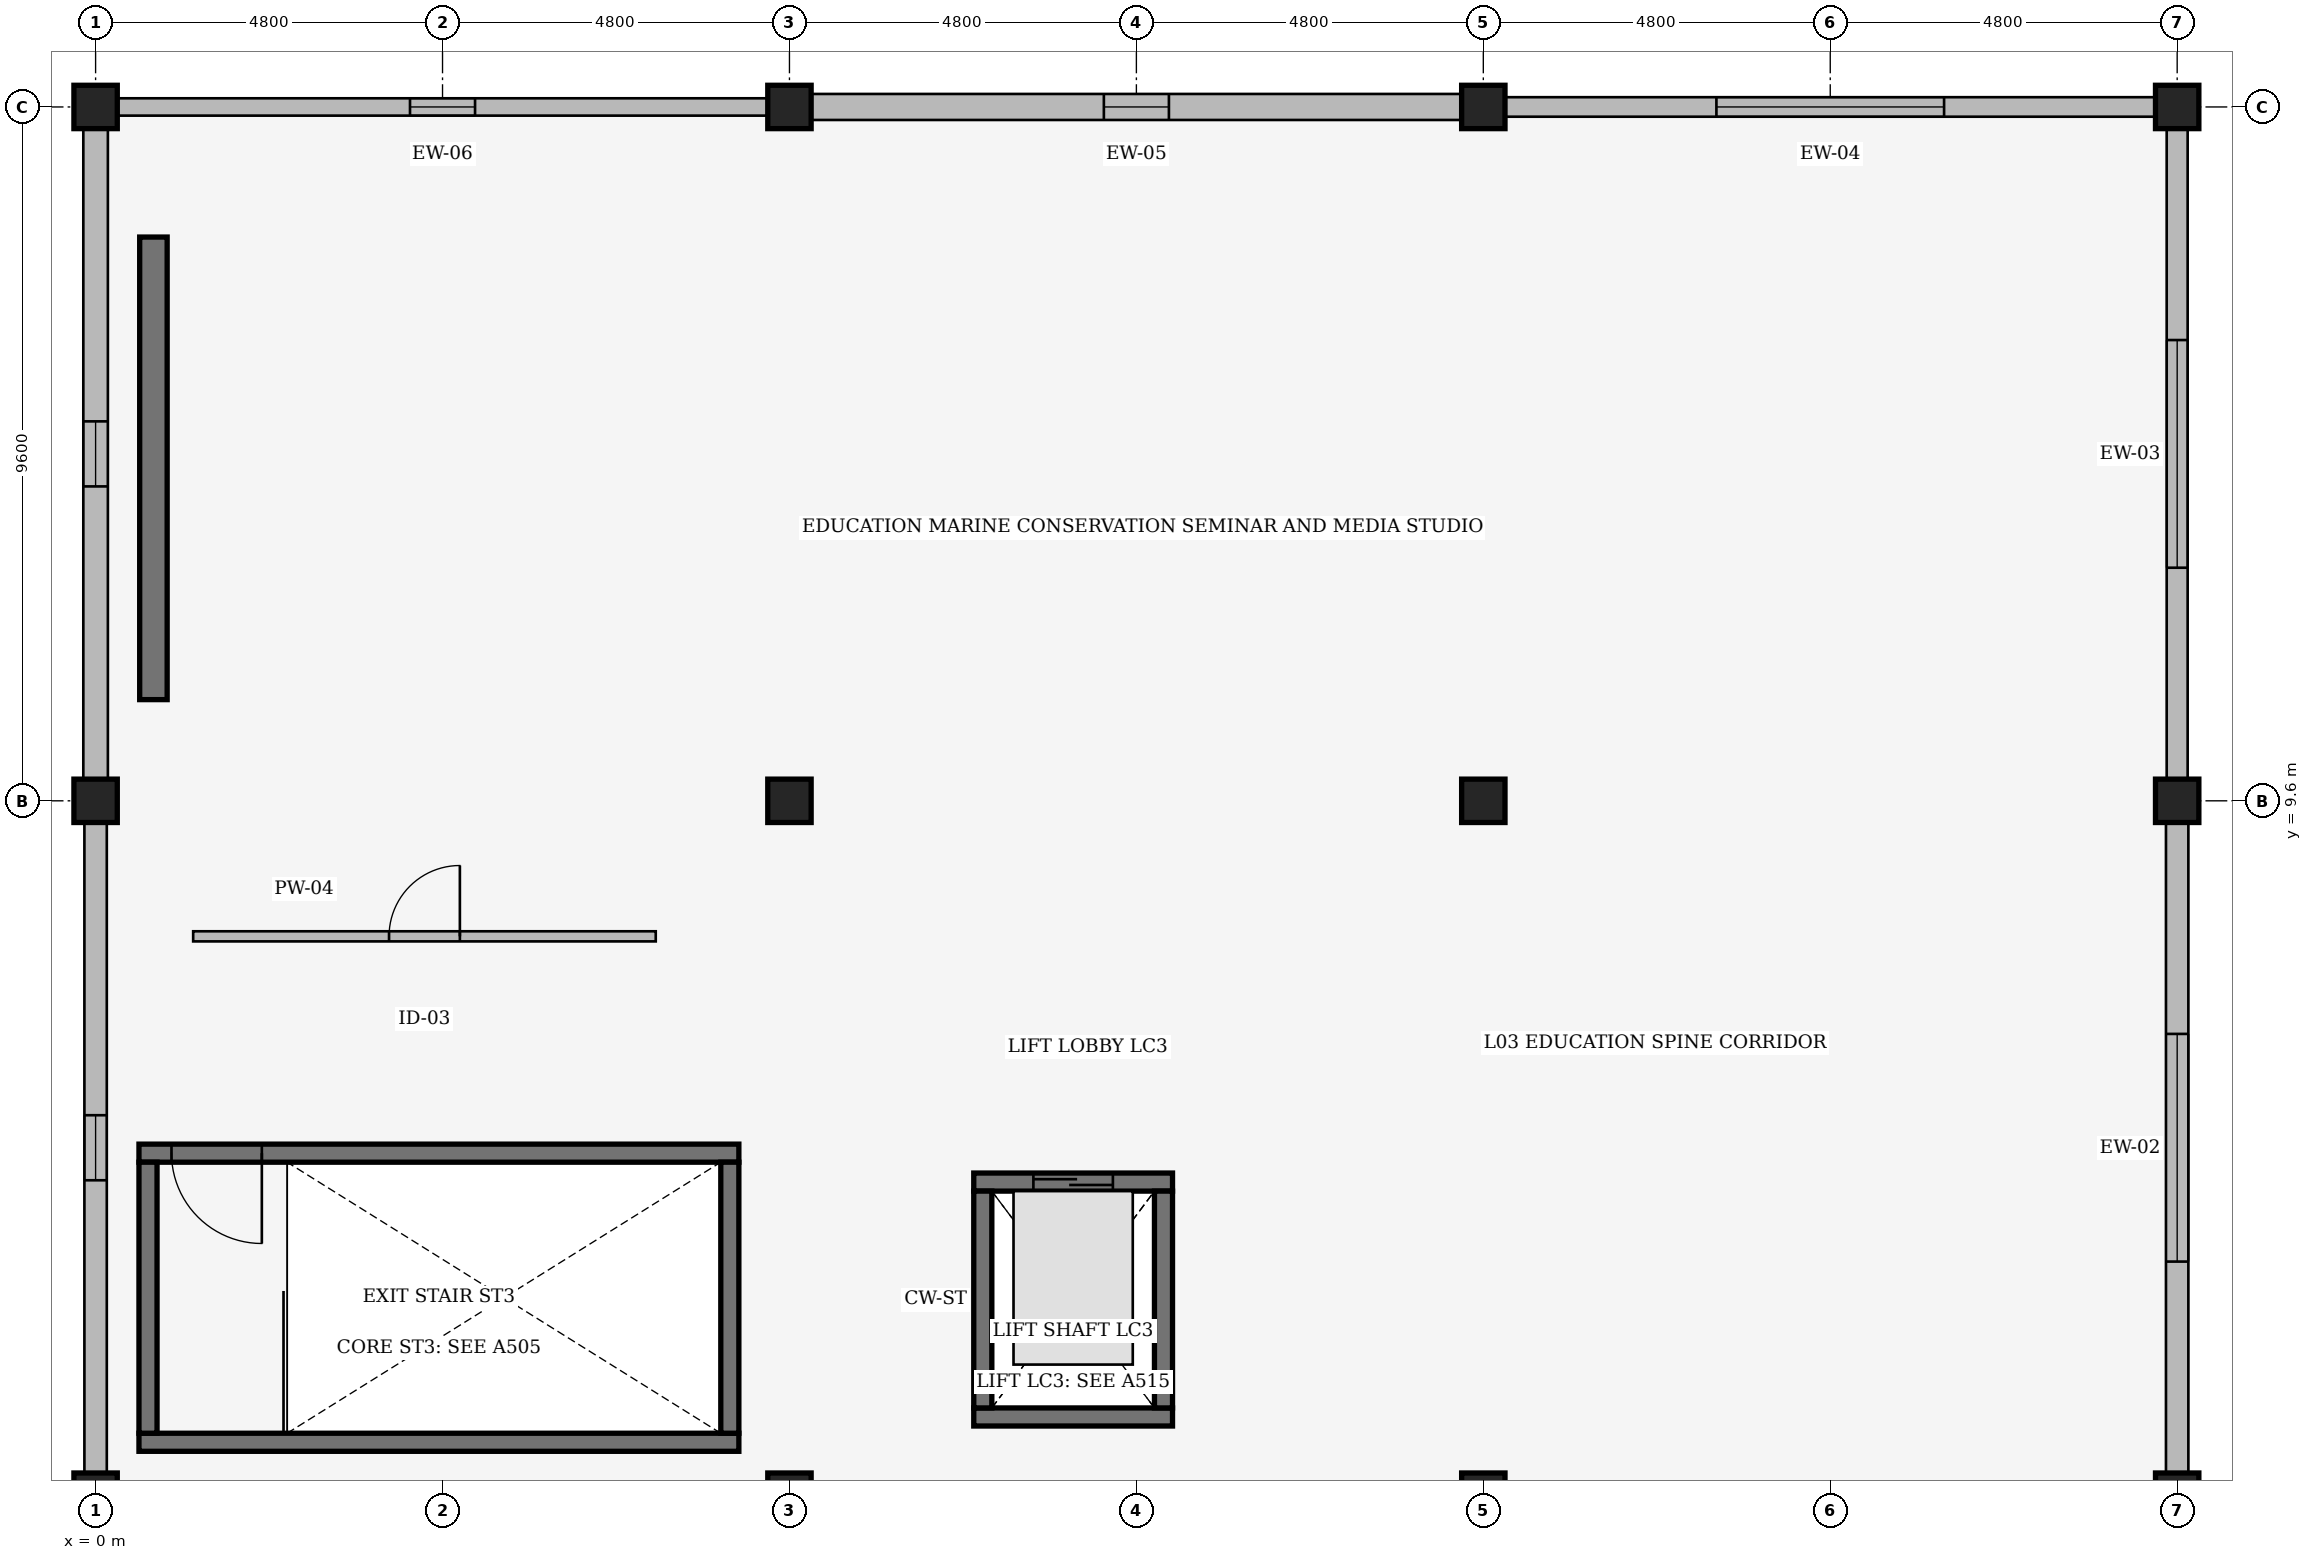
"""IFC4 building model, lengths in metres.
Left out: names, types, materials, properties, quantities, classifications, styles, units other than length and angle.
Written with IfcOpenShell. Run it as: python <this file> out.ifc"""

import sys

from ifc_helpers import new_model, si_unit, direction, frame, frame_2d, origin, origin_2d, place, context, subcontext, project, spatial, rectangle, extrude, element, fill, save


model = new_model("IFC4")
c1 = context("Model", 3, precision=1e-05, world=origin(), true_north=direction((0.0, 1.0)))
c2 = subcontext(c1, "Body", "Model", "MODEL_VIEW")
j1 = project(units=[si_unit("LENGTHUNIT", "METRE"), si_unit("PLANEANGLEUNIT", "RADIAN")], contexts=[c1])
p1 = place(None, origin())
s1 = spatial("IfcSite", under=j1, at=p1, CompositionType="ELEMENT")
p2 = place(p1, origin())
s2 = spatial("IfcBuilding", under=s1, at=p2, CompositionType="ELEMENT")
p3 = place(p2, frame((0.0, 0.0, 15.3)))
s3 = spatial("IfcBuildingStorey", under=s2, at=p3, CompositionType="ELEMENT", Elevation=15.3)
for number, where, z_axis, x_axis in (
    (1, (0.0, 0.0, 0.0), (0.0, 0.0, 1.0), (1.0, 0.0, 0.0)),
    (2, (0.0, 9.6, 0.0), (0.0, 0.0, 1.0), (1.0, 0.0, 0.0)),
    (3, (0.0, 19.2, 0.0), (0.0, 0.0, 1.0), (1.0, 0.0, 0.0)),
    (4, (9.6, 0.0, 0.0), (0.0, 0.0, 1.0), (1.0, 0.0, 0.0)),
    (5, (9.6, 9.6, 0.0), (0.0, 0.0, 1.0), (1.0, 0.0, 0.0)),
    (6, (9.6, 19.2, 0.0), (0.0, 0.0, 1.0), (1.0, 0.0, 0.0)),
    (7, (19.2, 0.0, 0.0), (0.0, 0.0, 1.0), (1.0, 0.0, 0.0)),
    (8, (19.2, 9.6, 0.0), (0.0, 0.0, 1.0), (1.0, 0.0, 0.0)),
    (9, (19.2, 19.2, 0.0), (0.0, 0.0, 1.0), (1.0, 0.0, 0.0)),
    (10, (28.8, 0.0, 0.0), (0.0, 0.0, 1.0), (1.0, 0.0, 0.0)),
    (11, (28.8, 9.6, 0.0), (0.0, 0.0, 1.0), (1.0, 0.0, 0.0)),
    (12, (28.8, 19.2, 0.0), (0.0, 0.0, 1.0), (1.0, 0.0, 0.0)),
):
    element("IfcColumn", number, at=place(p3, frame(where, z_axis=z_axis, x_axis=x_axis)), inside=s3, PredefinedType="COLUMN", context=c2, shape_type="SweptSolid", body=[
        extrude(rectangle(XDim=0.6, YDim=0.6, at=origin_2d()), origin(), (0.0, 0.0, 1.0), 4.5),
    ])
p4 = place(p3, frame((0.8, 11.0, 0.0), z_axis=(0.0, 0.0, 1.0), x_axis=(0.0, 1.0, 0.0)))
e13 = element("IfcWall", 13, at=p4, inside=s3, PredefinedType="SHEAR", context=c2, shape_type="SweptSolid", body=[
    extrude(rectangle(XDim=6.4, YDim=0.38, at=frame_2d((3.2, 0.0))), origin(), (0.0, 0.0, 1.0), 4.5),
])
p5 = place(p3, frame((28.8, 0.308, 0.0), z_axis=(0.0, 0.0, 1.0), x_axis=(0.0, 1.0, 0.0)))
e14 = element("IfcWall", 14, at=p5, inside=s3, PredefinedType="SOLIDWALL", context=c2, shape_type="SweptSolid", body=[
    extrude(rectangle(XDim=8.984, YDim=0.31, at=frame_2d((4.492, 0.0))), origin(), (0.0, 0.0, 1.0), 4.103),
])
p6 = place(p5, frame((2.917, 0.0, 0.95)))
e15 = element("IfcOpeningElement", 15, at=p6, cuts=e14, PredefinedType="OPENING", context=c2, shape_type="SweptSolid", body=[
    extrude(rectangle(XDim=3.15, YDim=1.5, at=frame_2d((1.575, 0.75))), frame((0.0, 0.165, 0.0), z_axis=(0.0, -1.0, 0.0), x_axis=(1.0, 0.0, 0.0)), (0.0, 0.0, 1.0), 0.33),
])
p7 = place(p3, frame((28.8, 9.908, 0.0), z_axis=(0.0, 0.0, 1.0), x_axis=(0.0, 1.0, 0.0)))
e16 = element("IfcWall", 16, at=p7, inside=s3, PredefinedType="SOLIDWALL", context=c2, shape_type="SweptSolid", body=[
    extrude(rectangle(XDim=8.984, YDim=0.29, at=frame_2d((4.492, 0.0))), origin(), (0.0, 0.0, 1.0), 4.103),
])
p8 = place(p7, frame((2.917, 0.0, 0.95)))
e17 = element("IfcOpeningElement", 17, at=p8, cuts=e16, PredefinedType="OPENING", context=c2, shape_type="SweptSolid", body=[
    extrude(rectangle(XDim=3.15, YDim=1.8, at=frame_2d((1.575, 0.9))), frame((0.0, 0.155, 0.0), z_axis=(0.0, -1.0, 0.0), x_axis=(1.0, 0.0, 0.0)), (0.0, 0.0, 1.0), 0.31),
])
p9 = place(p3, frame((28.492, 19.2, 0.0), z_axis=(0.0, 0.0, 1.0), x_axis=(-1.0, 0.0, 0.0)))
e18 = element("IfcWall", 18, at=p9, inside=s3, PredefinedType="SOLIDWALL", context=c2, shape_type="SweptSolid", body=[
    extrude(rectangle(XDim=8.984, YDim=0.27, at=frame_2d((4.492, 0.0))), origin(), (0.0, 0.0, 1.0), 4.103),
])
p10 = place(p9, frame((2.917, 0.0, 0.95)))
e19 = element("IfcOpeningElement", 19, at=p10, cuts=e18, PredefinedType="OPENING", context=c2, shape_type="SweptSolid", body=[
    extrude(rectangle(XDim=3.15, YDim=2.1, at=frame_2d((1.575, 1.05))), frame((0.0, 0.145, 0.0), z_axis=(0.0, -1.0, 0.0), x_axis=(1.0, 0.0, 0.0)), (0.0, 0.0, 1.0), 0.29),
])
p11 = place(p3, frame((18.892, 19.2, 0.0), z_axis=(0.0, 0.0, 1.0), x_axis=(-1.0, 0.0, 0.0)))
e20 = element("IfcWall", 20, at=p11, inside=s3, PredefinedType="SOLIDWALL", context=c2, shape_type="SweptSolid", body=[
    extrude(rectangle(XDim=8.984, YDim=0.36, at=frame_2d((4.492, 0.0))), origin(), (0.0, 0.0, 1.0), 4.103),
])
p12 = place(p11, frame((4.042, 0.0, 0.95)))
e21 = element("IfcOpeningElement", 21, at=p12, cuts=e20, PredefinedType="OPENING", context=c2, shape_type="SweptSolid", body=[
    extrude(rectangle(XDim=0.9, YDim=1.2, at=frame_2d((0.45, 0.6))), frame((0.0, 0.19, 0.0), z_axis=(0.0, -1.0, 0.0), x_axis=(1.0, 0.0, 0.0)), (0.0, 0.0, 1.0), 0.38),
])
p13 = place(p3, frame((9.292, 19.2, 0.0), z_axis=(0.0, 0.0, 1.0), x_axis=(-1.0, 0.0, 0.0)))
e22 = element("IfcWall", 22, at=p13, inside=s3, PredefinedType="SOLIDWALL", context=c2, shape_type="SweptSolid", body=[
    extrude(rectangle(XDim=8.984, YDim=0.24, at=frame_2d((4.492, 0.0))), origin(), (0.0, 0.0, 1.0), 4.103),
])
p14 = place(p13, frame((4.042, 0.0, 0.95)))
e23 = element("IfcOpeningElement", 23, at=p14, cuts=e22, PredefinedType="OPENING", context=c2, shape_type="SweptSolid", body=[
    extrude(rectangle(XDim=0.9, YDim=1.5, at=frame_2d((0.45, 0.75))), frame((0.0, 0.13, 0.0), z_axis=(0.0, -1.0, 0.0), x_axis=(1.0, 0.0, 0.0)), (0.0, 0.0, 1.0), 0.26),
])
p15 = place(p3, frame((0.0, 18.892, 0.0), z_axis=(0.0, 0.0, 1.0), x_axis=(0.0, -1.0, 0.0)))
e24 = element("IfcWall", 24, at=p15, inside=s3, PredefinedType="SOLIDWALL", context=c2, shape_type="SweptSolid", body=[
    extrude(rectangle(XDim=8.984, YDim=0.34, at=frame_2d((4.492, 0.0))), origin(), (0.0, 0.0, 1.0), 4.103),
])
p16 = place(p15, frame((4.042, 0.0, 0.95)))
e25 = element("IfcOpeningElement", 25, at=p16, cuts=e24, PredefinedType="OPENING", context=c2, shape_type="SweptSolid", body=[
    extrude(rectangle(XDim=0.9, YDim=1.8, at=frame_2d((0.45, 0.9))), frame((0.0, 0.18, 0.0), z_axis=(0.0, -1.0, 0.0), x_axis=(1.0, 0.0, 0.0)), (0.0, 0.0, 1.0), 0.36),
])
p17 = place(p3, frame((0.0, 9.292, 0.0), z_axis=(0.0, 0.0, 1.0), x_axis=(0.0, -1.0, 0.0)))
e26 = element("IfcWall", 26, at=p17, inside=s3, PredefinedType="SOLIDWALL", context=c2, shape_type="SweptSolid", body=[
    extrude(rectangle(XDim=8.984, YDim=0.31, at=frame_2d((4.492, 0.0))), origin(), (0.0, 0.0, 1.0), 4.103),
])
p18 = place(p17, frame((4.042, 0.0, 0.95)))
e27 = element("IfcOpeningElement", 27, at=p18, cuts=e26, PredefinedType="OPENING", context=c2, shape_type="SweptSolid", body=[
    extrude(rectangle(XDim=0.9, YDim=2.1, at=frame_2d((0.45, 1.05))), frame((0.0, 0.165, 0.0), z_axis=(0.0, -1.0, 0.0), x_axis=(1.0, 0.0, 0.0)), (0.0, 0.0, 1.0), 0.33),
])
p19 = place(p3, frame((0.6, 0.725, 0.0), z_axis=(0.0, 0.0, 1.0), x_axis=(1.0, 0.0, 0.0)))
e28 = element("IfcWall", 28, at=p19, inside=s3, PredefinedType="SHEAR", context=c2, shape_type="SweptSolid", body=[
    extrude(rectangle(XDim=8.3, YDim=0.25, at=frame_2d((4.15, 0.0))), origin(), (0.0, 0.0, 1.0), 4.5),
])
p20 = place(p3, frame((8.9, 4.725, 0.0), z_axis=(0.0, 0.0, 1.0), x_axis=(-1.0, 0.0, 0.0)))
e29 = element("IfcWall", 29, at=p20, inside=s3, PredefinedType="SHEAR", context=c2, shape_type="SweptSolid", body=[
    extrude(rectangle(XDim=8.3, YDim=0.25, at=frame_2d((4.15, 0.0))), origin(), (0.0, 0.0, 1.0), 4.5),
])
p21 = place(p20, frame((7.85, 0.0, 0.0), z_axis=(0.0, 0.0, 1.0), x_axis=(-1.0, 0.0, 0.0)))
e30 = element("IfcOpeningElement", 30, at=p21, cuts=e29, PredefinedType="OPENING", context=c2, shape_type="SweptSolid", body=[
    extrude(rectangle(XDim=1.25, YDim=2.2, at=frame_2d((0.625, 1.1))), frame((0.0, 0.135, 0.0), z_axis=(0.0, -1.0, 0.0), x_axis=(1.0, 0.0, 0.0)), (0.0, 0.0, 1.0), 0.27),
])
for number, where, z_axis, x_axis in (
    (31, (0.725, 4.6, 0.0), (0.0, 0.0, 1.0), (0.0, -1.0, 0.0)),
    (32, (8.775, 0.85, 0.0), (0.0, 0.0, 1.0), (0.0, 1.0, 0.0)),
):
    element("IfcWall", number, at=place(p3, frame(where, z_axis=z_axis, x_axis=x_axis)), inside=s3, PredefinedType="SHEAR", context=c2, shape_type="SweptSolid", body=[
        extrude(rectangle(XDim=3.75, YDim=0.25, at=frame_2d((1.875, 0.0))), origin(), (0.0, 0.0, 1.0), 4.5),
    ])
p22 = place(p3, frame((12.15, 1.075, 0.0), z_axis=(0.0, 0.0, 1.0), x_axis=(1.0, 0.0, 0.0)))
e33 = element("IfcWall", 33, at=p22, inside=s3, PredefinedType="SHEAR", context=c2, shape_type="SweptSolid", body=[
    extrude(rectangle(XDim=2.75, YDim=0.25, at=frame_2d((1.375, 0.0))), origin(), (0.0, 0.0, 1.0), 4.5),
])
p23 = place(p3, frame((12.15, 4.325, 0.0), z_axis=(0.0, 0.0, 1.0), x_axis=(1.0, 0.0, 0.0)))
e34 = element("IfcWall", 34, at=p23, inside=s3, PredefinedType="SHEAR", context=c2, shape_type="SweptSolid", body=[
    extrude(rectangle(XDim=2.75, YDim=0.25, at=frame_2d((1.375, 0.0))), origin(), (0.0, 0.0, 1.0), 4.5),
])
p24 = place(p23, frame((0.825, 0.0, 0.0)))
e35 = element("IfcOpeningElement", 35, at=p24, cuts=e34, PredefinedType="OPENING", context=c2, shape_type="SweptSolid", body=[
    extrude(rectangle(XDim=1.1, YDim=2.2, at=frame_2d((0.55, 1.1))), frame((0.0, 0.135, 0.0), z_axis=(0.0, -1.0, 0.0), x_axis=(1.0, 0.0, 0.0)), (0.0, 0.0, 1.0), 0.27),
])
for number, where, z_axis, x_axis in (
    (36, (12.275, 1.2, 0.0), (0.0, 0.0, 1.0), (0.0, 1.0, 0.0)),
    (37, (14.775, 1.2, 0.0), (0.0, 0.0, 1.0), (0.0, 1.0, 0.0)),
):
    element("IfcWall", number, at=place(p3, frame(where, z_axis=z_axis, x_axis=x_axis)), inside=s3, PredefinedType="SHEAR", context=c2, shape_type="SweptSolid", body=[
        extrude(rectangle(XDim=3.0, YDim=0.25, at=frame_2d((1.5, 0.0))), origin(), (0.0, 0.0, 1.0), 4.5),
    ])
p25 = place(p3, frame((1.35, 7.725, 0.0), z_axis=(0.0, 0.0, 1.0), x_axis=(1.0, 0.0, 0.0)))
e38 = element("IfcWall", 38, at=p25, inside=s3, PredefinedType="PARTITIONING", context=c2, shape_type="SweptSolid", body=[
    extrude(rectangle(XDim=6.4, YDim=0.14, at=frame_2d((3.2, 0.0))), origin(), (0.0, 0.0, 1.0), 4.14),
])
p26 = place(p25, frame((2.71, 0.0, 0.0)))
e39 = element("IfcOpeningElement", 39, at=p26, cuts=e38, PredefinedType="OPENING", context=c2, shape_type="SweptSolid", body=[
    extrude(rectangle(XDim=0.98, YDim=2.15, at=frame_2d((0.49, 1.075))), frame((0.0, 0.08, 0.0), z_axis=(0.0, -1.0, 0.0), x_axis=(1.0, 0.0, 0.0)), (0.0, 0.0, 1.0), 0.16),
])
p27 = place(p6, origin())
e40 = element("IfcWindow", 40, at=p27, inside=s3, PartitioningType="SINGLE_PANEL", PredefinedType="WINDOW", context=c2, shape_type="SweptSolid", body=[
    extrude(rectangle(XDim=3.15, YDim=1.5, at=frame_2d((1.575, 0.75))), frame((0.0, 0.03, 0.0), z_axis=(0.0, -1.0, 0.0), x_axis=(1.0, 0.0, 0.0)), (0.0, 0.0, 1.0), 0.06),
])
fill(e15, e40)
p28 = place(p8, origin())
e41 = element("IfcWindow", 41, at=p28, inside=s3, PartitioningType="SINGLE_PANEL", PredefinedType="WINDOW", context=c2, shape_type="SweptSolid", body=[
    extrude(rectangle(XDim=3.15, YDim=1.8, at=frame_2d((1.575, 0.9))), frame((0.0, 0.03, 0.0), z_axis=(0.0, -1.0, 0.0), x_axis=(1.0, 0.0, 0.0)), (0.0, 0.0, 1.0), 0.06),
])
fill(e17, e41)
p29 = place(p10, origin())
e42 = element("IfcWindow", 42, at=p29, inside=s3, PartitioningType="SINGLE_PANEL", PredefinedType="WINDOW", context=c2, shape_type="SweptSolid", body=[
    extrude(rectangle(XDim=3.15, YDim=2.1, at=frame_2d((1.575, 1.05))), frame((0.0, 0.03, 0.0), z_axis=(0.0, -1.0, 0.0), x_axis=(1.0, 0.0, 0.0)), (0.0, 0.0, 1.0), 0.06),
])
fill(e19, e42)
p30 = place(p12, origin())
e43 = element("IfcWindow", 43, at=p30, inside=s3, PartitioningType="SINGLE_PANEL", PredefinedType="WINDOW", context=c2, shape_type="SweptSolid", body=[
    extrude(rectangle(XDim=0.9, YDim=1.2, at=frame_2d((0.45, 0.6))), frame((0.0, 0.03, 0.0), z_axis=(0.0, -1.0, 0.0), x_axis=(1.0, 0.0, 0.0)), (0.0, 0.0, 1.0), 0.06),
])
fill(e21, e43)
p31 = place(p14, origin())
e44 = element("IfcWindow", 44, at=p31, inside=s3, PartitioningType="SINGLE_PANEL", PredefinedType="WINDOW", context=c2, shape_type="SweptSolid", body=[
    extrude(rectangle(XDim=0.9, YDim=1.5, at=frame_2d((0.45, 0.75))), frame((0.0, 0.03, 0.0), z_axis=(0.0, -1.0, 0.0), x_axis=(1.0, 0.0, 0.0)), (0.0, 0.0, 1.0), 0.06),
])
fill(e23, e44)
p32 = place(p16, origin())
e45 = element("IfcWindow", 45, at=p32, inside=s3, PartitioningType="SINGLE_PANEL", PredefinedType="WINDOW", context=c2, shape_type="SweptSolid", body=[
    extrude(rectangle(XDim=0.9, YDim=1.8, at=frame_2d((0.45, 0.9))), frame((0.0, 0.03, 0.0), z_axis=(0.0, -1.0, 0.0), x_axis=(1.0, 0.0, 0.0)), (0.0, 0.0, 1.0), 0.06),
])
fill(e25, e45)
p33 = place(p18, origin())
e46 = element("IfcWindow", 46, at=p33, inside=s3, PartitioningType="SINGLE_PANEL", PredefinedType="WINDOW", context=c2, shape_type="SweptSolid", body=[
    extrude(rectangle(XDim=0.9, YDim=2.1, at=frame_2d((0.45, 1.05))), frame((0.0, 0.03, 0.0), z_axis=(0.0, -1.0, 0.0), x_axis=(1.0, 0.0, 0.0)), (0.0, 0.0, 1.0), 0.06),
])
fill(e27, e46)
p34 = place(p21, origin())
e47 = element("IfcDoor", 47, at=p34, inside=s3, OperationType="SINGLE_SWING_RIGHT", PredefinedType="DOOR", context=c2, shape_type="SweptSolid", body=[
    extrude(rectangle(XDim=1.25, YDim=2.2, at=frame_2d((0.625, 1.1))), frame((0.0, 0.025, 0.0), z_axis=(0.0, -1.0, 0.0), x_axis=(1.0, 0.0, 0.0)), (0.0, 0.0, 1.0), 0.05),
])
fill(e30, e47)
p35 = place(p24, origin())
e48 = element("IfcDoor", 48, at=p35, inside=s3, OperationType="DOUBLE_DOOR_SLIDING", PredefinedType="DOOR", context=c2, shape_type="SweptSolid", body=[
    extrude(rectangle(XDim=1.1, YDim=2.2, at=frame_2d((0.55, 1.1))), frame((0.0, 0.025, 0.0), z_axis=(0.0, -1.0, 0.0), x_axis=(1.0, 0.0, 0.0)), (0.0, 0.0, 1.0), 0.05),
])
fill(e35, e48)
p36 = place(p26, origin())
e49 = element("IfcDoor", 49, at=p36, inside=s3, OperationType="SINGLE_SWING_RIGHT", PredefinedType="DOOR", context=c2, shape_type="SweptSolid", body=[
    extrude(rectangle(XDim=0.98, YDim=2.15, at=frame_2d((0.49, 1.075))), frame((0.0, 0.025, 0.0), z_axis=(0.0, -1.0, 0.0), x_axis=(1.0, 0.0, 0.0)), (0.0, 0.0, 1.0), 0.05),
])
fill(e39, e49)
save(model, sys.argv[1])
